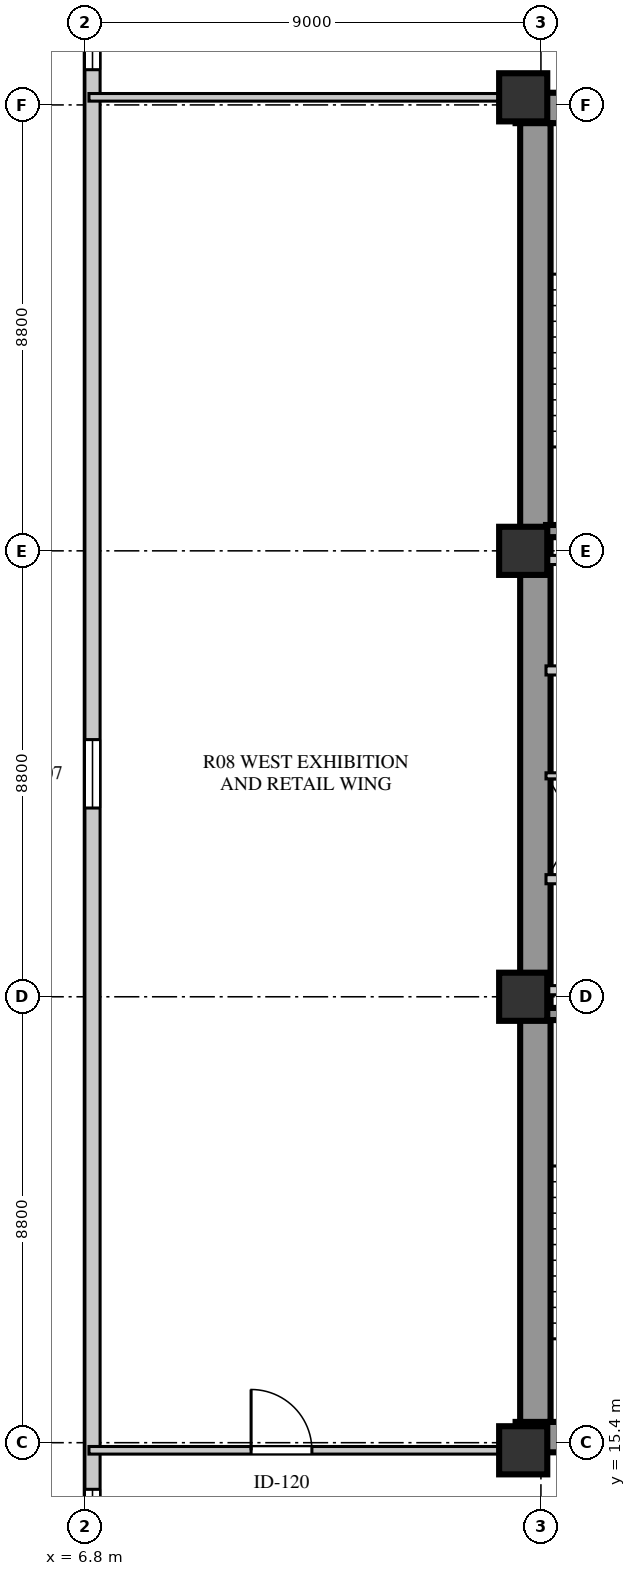
"""IFC4 building model, lengths in metres.
Left out: names, types, materials, properties, quantities, classifications, styles, units other than length and angle.
Written with IfcOpenShell. Run it as: python <this file> out.ifc"""

import sys

from ifc_helpers import new_model, si_unit, direction, frame, frame_2d, origin, origin_2d, place, context, subcontext, project, spatial, rectangle, extrude, element, fill, save


model = new_model("IFC4")
c1 = context("Model", 3, precision=1e-05, world=origin(), true_north=direction((0.0, 1.0)))
c2 = subcontext(c1, "Body", "Model", "MODEL_VIEW")
j1 = project(units=[si_unit("LENGTHUNIT", "METRE"), si_unit("PLANEANGLEUNIT", "RADIAN")], contexts=[c1])
p1 = place(None, origin())
s1 = spatial("IfcSite", under=j1, at=p1, CompositionType="ELEMENT")
p2 = place(p1, origin())
s2 = spatial("IfcBuilding", under=s1, at=p2, CompositionType="ELEMENT")
p3 = place(p2, frame((0.0, 0.0, 12.5)))
s3 = spatial("IfcBuildingStorey", under=s2, at=p3, CompositionType="ELEMENT", Elevation=12.5)
for number, where, z_axis, x_axis in (
    (1, (15.3, 15.51, 0.0), (0.0, 0.0, 1.0), (1.0, 0.0, 0.0)),
    (2, (15.3, 41.74, 0.0), (0.0, 0.0, 1.0), (1.0, 0.0, 0.0)),
):
    element("IfcWall", number, at=place(p3, frame(where, z_axis=z_axis, x_axis=x_axis)), inside=s3, PredefinedType="SHEAR", context=c2, shape_type="SweptSolid", body=[
        extrude(rectangle(XDim=9.88, YDim=0.6, at=frame_2d((4.94, 0.0))), origin(), (0.0, 0.0, 1.0), 4.22),
    ])
p4 = place(p3, frame((15.69, 15.81, 0.0), z_axis=(0.0, 0.0, 1.0), x_axis=(0.0, 1.0, 0.0)))
e3 = element("IfcWall", 3, at=p4, inside=s3, PredefinedType="SHEAR", context=c2, shape_type="SweptSolid", body=[
    extrude(rectangle(XDim=25.63, YDim=0.6, at=frame_2d((12.815, 0.0))), origin(), (0.0, 0.0, 1.0), 4.22),
])
for number, where, z_axis, x_axis in (
    (4, (15.45, 15.25, 0.0), (0.0, 0.0, 1.0), (1.0, 0.0, 0.0)),
    (5, (15.45, 24.2, 0.0), (0.0, 0.0, 1.0), (1.0, 0.0, 0.0)),
    (6, (15.45, 33.0, 0.0), (0.0, 0.0, 1.0), (1.0, 0.0, 0.0)),
    (7, (15.45, 41.95, 0.0), (0.0, 0.0, 1.0), (1.0, 0.0, 0.0)),
):
    element("IfcColumn", number, at=place(p3, frame(where, z_axis=z_axis, x_axis=x_axis)), inside=s3, PredefinedType="COLUMN", context=c2, shape_type="SweptSolid", body=[
        extrude(rectangle(XDim=0.95, YDim=0.95, at=origin_2d()), origin(), (0.0, 0.0, 1.0), 4.22),
    ])
p5 = place(p3, frame((6.95, 44.8, 0.0), z_axis=(0.0, 0.0, 1.0), x_axis=(0.0, -1.0, 0.0)))
e8 = element("IfcWall", 8, at=p5, inside=s3, PredefinedType="STANDARD", context=c2, shape_type="SweptSolid", body=[
    extrude(rectangle(XDim=32.4, YDim=0.3, at=frame_2d((16.2, 0.0))), origin(), (0.0, 0.0, 1.0), 4.22),
])
p6 = place(p5, frame((30.32, 0.0, 0.8)))
e9 = element("IfcOpeningElement", 9, at=p6, cuts=e8, PredefinedType="OPENING", context=c2, shape_type="SweptSolid", body=[
    extrude(rectangle(XDim=1.2, YDim=1.75, at=frame_2d((0.6, 0.875))), frame((0.0, 0.16, 0.0), z_axis=(0.0, -1.0, 0.0), x_axis=(1.0, 0.0, 0.0)), (0.0, 0.0, 1.0), 0.32),
])
p7 = place(p5, frame((15.525, 0.0, 0.8)))
e10 = element("IfcOpeningElement", 10, at=p7, cuts=e8, PredefinedType="OPENING", context=c2, shape_type="SweptSolid", body=[
    extrude(rectangle(XDim=1.35, YDim=1.9, at=frame_2d((0.675, 0.95))), frame((0.0, 0.16, 0.0), z_axis=(0.0, -1.0, 0.0), x_axis=(1.0, 0.0, 0.0)), (0.0, 0.0, 1.0), 0.32),
])
p8 = place(p5, frame((0.655, 0.0, 0.8)))
e11 = element("IfcOpeningElement", 11, at=p8, cuts=e8, PredefinedType="OPENING", context=c2, shape_type="SweptSolid", body=[
    extrude(rectangle(XDim=1.65, YDim=1.95, at=frame_2d((0.825, 0.975))), frame((0.0, 0.16, 0.0), z_axis=(0.0, -1.0, 0.0), x_axis=(1.0, 0.0, 0.0)), (0.0, 0.0, 1.0), 0.32),
])
p9 = place(p3, frame((15.9, 23.86, 0.0), z_axis=(0.0, 0.0, 1.0), x_axis=(1.0, 0.0, 0.0)))
e12 = element("IfcWall", 12, at=p9, inside=s3, PredefinedType="SHEAR", context=c2, shape_type="SweptSolid", body=[
    extrude(rectangle(XDim=3.52, YDim=0.24, at=frame_2d((1.76, 0.0))), origin(), (0.0, 0.0, 1.0), 4.5),
])
p10 = place(p3, frame((15.9, 26.52, 0.0), z_axis=(0.0, 0.0, 1.0), x_axis=(1.0, 0.0, 0.0)))
e13 = element("IfcWall", 13, at=p10, inside=s3, PredefinedType="SOLIDWALL", context=c2, shape_type="SweptSolid", body=[
    extrude(rectangle(XDim=8.68, YDim=0.18, at=frame_2d((4.34, 0.0))), origin(), (0.0, 0.0, 1.0), 4.22),
])
p11 = place(p10, frame((1.76, 0.0, 0.0)))
e14 = element("IfcOpeningElement", 14, at=p11, cuts=e13, PredefinedType="OPENING", context=c2, shape_type="SweptSolid", body=[
    extrude(rectangle(XDim=1.0, YDim=2.1, at=frame_2d((0.5, 1.05))), frame((0.0, 0.1, 0.0), z_axis=(0.0, -1.0, 0.0), x_axis=(1.0, 0.0, 0.0)), (0.0, 0.0, 1.0), 0.2),
])
p12 = place(p10, frame((3.6, 0.0, 0.0)))
e15 = element("IfcOpeningElement", 15, at=p12, cuts=e13, PredefinedType="OPENING", context=c2, shape_type="SweptSolid", body=[
    extrude(rectangle(XDim=1.0, YDim=2.1, at=frame_2d((0.5, 1.05))), frame((0.0, 0.1, 0.0), z_axis=(0.0, -1.0, 0.0), x_axis=(1.0, 0.0, 0.0)), (0.0, 0.0, 1.0), 0.2),
])
p13 = place(p10, frame((5.44, 0.0, 0.0)))
e16 = element("IfcOpeningElement", 16, at=p13, cuts=e13, PredefinedType="OPENING", context=c2, shape_type="SweptSolid", body=[
    extrude(rectangle(XDim=1.0, YDim=2.1, at=frame_2d((0.5, 1.05))), frame((0.0, 0.1, 0.0), z_axis=(0.0, -1.0, 0.0), x_axis=(1.0, 0.0, 0.0)), (0.0, 0.0, 1.0), 0.2),
])
p14 = place(p10, frame((7.28, 0.0, 0.0)))
e17 = element("IfcOpeningElement", 17, at=p14, cuts=e13, PredefinedType="OPENING", context=c2, shape_type="SweptSolid", body=[
    extrude(rectangle(XDim=1.0, YDim=2.1, at=frame_2d((0.5, 1.05))), frame((0.0, 0.1, 0.0), z_axis=(0.0, -1.0, 0.0), x_axis=(1.0, 0.0, 0.0)), (0.0, 0.0, 1.0), 0.2),
])
p15 = place(p3, frame((15.9, 24.33, 0.0), z_axis=(0.0, 0.0, 1.0), x_axis=(1.0, 0.0, 0.0)))
e18 = element("IfcWall", 18, at=p15, inside=s3, PredefinedType="SOLIDWALL", context=c2, shape_type="SweptSolid", body=[
    extrude(rectangle(XDim=8.68, YDim=0.18, at=frame_2d((4.34, 0.0))), origin(), (0.0, 0.0, 1.0), 3.42),
])
p16 = place(p3, frame((15.9, 28.56, 0.0), z_axis=(0.0, 0.0, 1.0), x_axis=(1.0, 0.0, 0.0)))
e19 = element("IfcWall", 19, at=p16, inside=s3, PredefinedType="PARTITIONING", context=c2, shape_type="SweptSolid", body=[
    extrude(rectangle(XDim=1.2, YDim=0.12, at=frame_2d((0.6, 0.0))), origin(), (0.0, 0.0, 1.0), 4.22),
])
p17 = place(p3, frame((15.9, 30.64, 0.0), z_axis=(0.0, 0.0, 1.0), x_axis=(1.0, 0.0, 0.0)))
e20 = element("IfcWall", 20, at=p17, inside=s3, PredefinedType="SOLIDWALL", context=c2, shape_type="SweptSolid", body=[
    extrude(rectangle(XDim=8.68, YDim=0.18, at=frame_2d((4.34, 0.0))), origin(), (0.0, 0.0, 1.0), 4.22),
])
p18 = place(p17, frame((1.76, 0.0, 0.0)))
e21 = element("IfcOpeningElement", 21, at=p18, cuts=e20, PredefinedType="OPENING", context=c2, shape_type="SweptSolid", body=[
    extrude(rectangle(XDim=1.0, YDim=2.1, at=frame_2d((0.5, 1.05))), frame((0.0, 0.1, 0.0), z_axis=(0.0, -1.0, 0.0), x_axis=(1.0, 0.0, 0.0)), (0.0, 0.0, 1.0), 0.2),
])
p19 = place(p17, frame((3.6, 0.0, 0.0)))
e22 = element("IfcOpeningElement", 22, at=p19, cuts=e20, PredefinedType="OPENING", context=c2, shape_type="SweptSolid", body=[
    extrude(rectangle(XDim=1.0, YDim=2.1, at=frame_2d((0.5, 1.05))), frame((0.0, 0.1, 0.0), z_axis=(0.0, -1.0, 0.0), x_axis=(1.0, 0.0, 0.0)), (0.0, 0.0, 1.0), 0.2),
])
p20 = place(p17, frame((5.44, 0.0, 0.0)))
e23 = element("IfcOpeningElement", 23, at=p20, cuts=e20, PredefinedType="OPENING", context=c2, shape_type="SweptSolid", body=[
    extrude(rectangle(XDim=1.0, YDim=2.1, at=frame_2d((0.5, 1.05))), frame((0.0, 0.1, 0.0), z_axis=(0.0, -1.0, 0.0), x_axis=(1.0, 0.0, 0.0)), (0.0, 0.0, 1.0), 0.2),
])
p21 = place(p17, frame((7.28, 0.0, 0.0)))
e24 = element("IfcOpeningElement", 24, at=p21, cuts=e20, PredefinedType="OPENING", context=c2, shape_type="SweptSolid", body=[
    extrude(rectangle(XDim=1.0, YDim=2.1, at=frame_2d((0.5, 1.05))), frame((0.0, 0.1, 0.0), z_axis=(0.0, -1.0, 0.0), x_axis=(1.0, 0.0, 0.0)), (0.0, 0.0, 1.0), 0.2),
])
p22 = place(p3, frame((15.9, 32.82, 0.0), z_axis=(0.0, 0.0, 1.0), x_axis=(1.0, 0.0, 0.0)))
e25 = element("IfcWall", 25, at=p22, inside=s3, PredefinedType="SOLIDWALL", context=c2, shape_type="SweptSolid", body=[
    extrude(rectangle(XDim=8.68, YDim=0.18, at=frame_2d((4.34, 0.0))), origin(), (0.0, 0.0, 1.0), 3.42),
])
p23 = place(p3, frame((15.9, 33.39, 0.0), z_axis=(0.0, 0.0, 1.0), x_axis=(1.0, 0.0, 0.0)))
e26 = element("IfcWall", 26, at=p23, inside=s3, PredefinedType="SHEAR", context=c2, shape_type="SweptSolid", body=[
    extrude(rectangle(XDim=3.52, YDim=0.24, at=frame_2d((1.76, 0.0))), origin(), (0.0, 0.0, 1.0), 4.5),
])
p24 = place(p3, frame((6.88, 15.25, 0.0), z_axis=(0.0, 0.0, 1.0), x_axis=(1.0, 0.0, 0.0)))
e27 = element("IfcWall", 27, at=p24, inside=s3, PredefinedType="PARTITIONING", context=c2, shape_type="SweptSolid", body=[
    extrude(rectangle(XDim=8.32, YDim=0.15, at=frame_2d((4.16, 0.0))), origin(), (0.0, 0.0, 1.0), 3.72),
])
p25 = place(p24, frame((3.2, 0.0, 0.0)))
e28 = element("IfcOpeningElement", 28, at=p25, cuts=e27, PredefinedType="OPENING", context=c2, shape_type="SweptSolid", body=[
    extrude(rectangle(XDim=1.2, YDim=2.1, at=frame_2d((0.6, 1.05))), frame((0.0, 0.085, 0.0), z_axis=(0.0, -1.0, 0.0), x_axis=(1.0, 0.0, 0.0)), (0.0, 0.0, 1.0), 0.17),
])
p26 = place(p3, frame((6.88, 41.95, 0.0), z_axis=(0.0, 0.0, 1.0), x_axis=(1.0, 0.0, 0.0)))
e29 = element("IfcWall", 29, at=p26, inside=s3, PredefinedType="PARTITIONING", context=c2, shape_type="SweptSolid", body=[
    extrude(rectangle(XDim=8.32, YDim=0.15, at=frame_2d((4.16, 0.0))), origin(), (0.0, 0.0, 1.0), 3.72),
])
p27 = place(p6, origin())
e30 = element("IfcWindow", 30, at=p27, inside=s3, PartitioningType="SINGLE_PANEL", PredefinedType="WINDOW", context=c2, shape_type="SweptSolid", body=[
    extrude(rectangle(XDim=1.2, YDim=1.75, at=frame_2d((0.6, 0.875))), frame((0.0, 0.03, 0.0), z_axis=(0.0, -1.0, 0.0), x_axis=(1.0, 0.0, 0.0)), (0.0, 0.0, 1.0), 0.06),
])
fill(e9, e30)
p28 = place(p7, origin())
e31 = element("IfcWindow", 31, at=p28, inside=s3, PartitioningType="SINGLE_PANEL", PredefinedType="WINDOW", context=c2, shape_type="SweptSolid", body=[
    extrude(rectangle(XDim=1.35, YDim=1.9, at=frame_2d((0.675, 0.95))), frame((0.0, 0.03, 0.0), z_axis=(0.0, -1.0, 0.0), x_axis=(1.0, 0.0, 0.0)), (0.0, 0.0, 1.0), 0.06),
])
fill(e10, e31)
p29 = place(p8, origin())
e32 = element("IfcWindow", 32, at=p29, inside=s3, PartitioningType="SINGLE_PANEL", PredefinedType="WINDOW", context=c2, shape_type="SweptSolid", body=[
    extrude(rectangle(XDim=1.65, YDim=1.95, at=frame_2d((0.825, 0.975))), frame((0.0, 0.03, 0.0), z_axis=(0.0, -1.0, 0.0), x_axis=(1.0, 0.0, 0.0)), (0.0, 0.0, 1.0), 0.06),
])
fill(e11, e32)
p30 = place(p25, origin())
e33 = element("IfcDoor", 33, at=p30, inside=s3, OperationType="SINGLE_SWING_LEFT", PredefinedType="DOOR", context=c2, shape_type="SweptSolid", body=[
    extrude(rectangle(XDim=1.2, YDim=2.1, at=frame_2d((0.6, 1.05))), frame((0.0, 0.025, 0.0), z_axis=(0.0, -1.0, 0.0), x_axis=(1.0, 0.0, 0.0)), (0.0, 0.0, 1.0), 0.05),
])
fill(e28, e33)
save(model, sys.argv[1])
